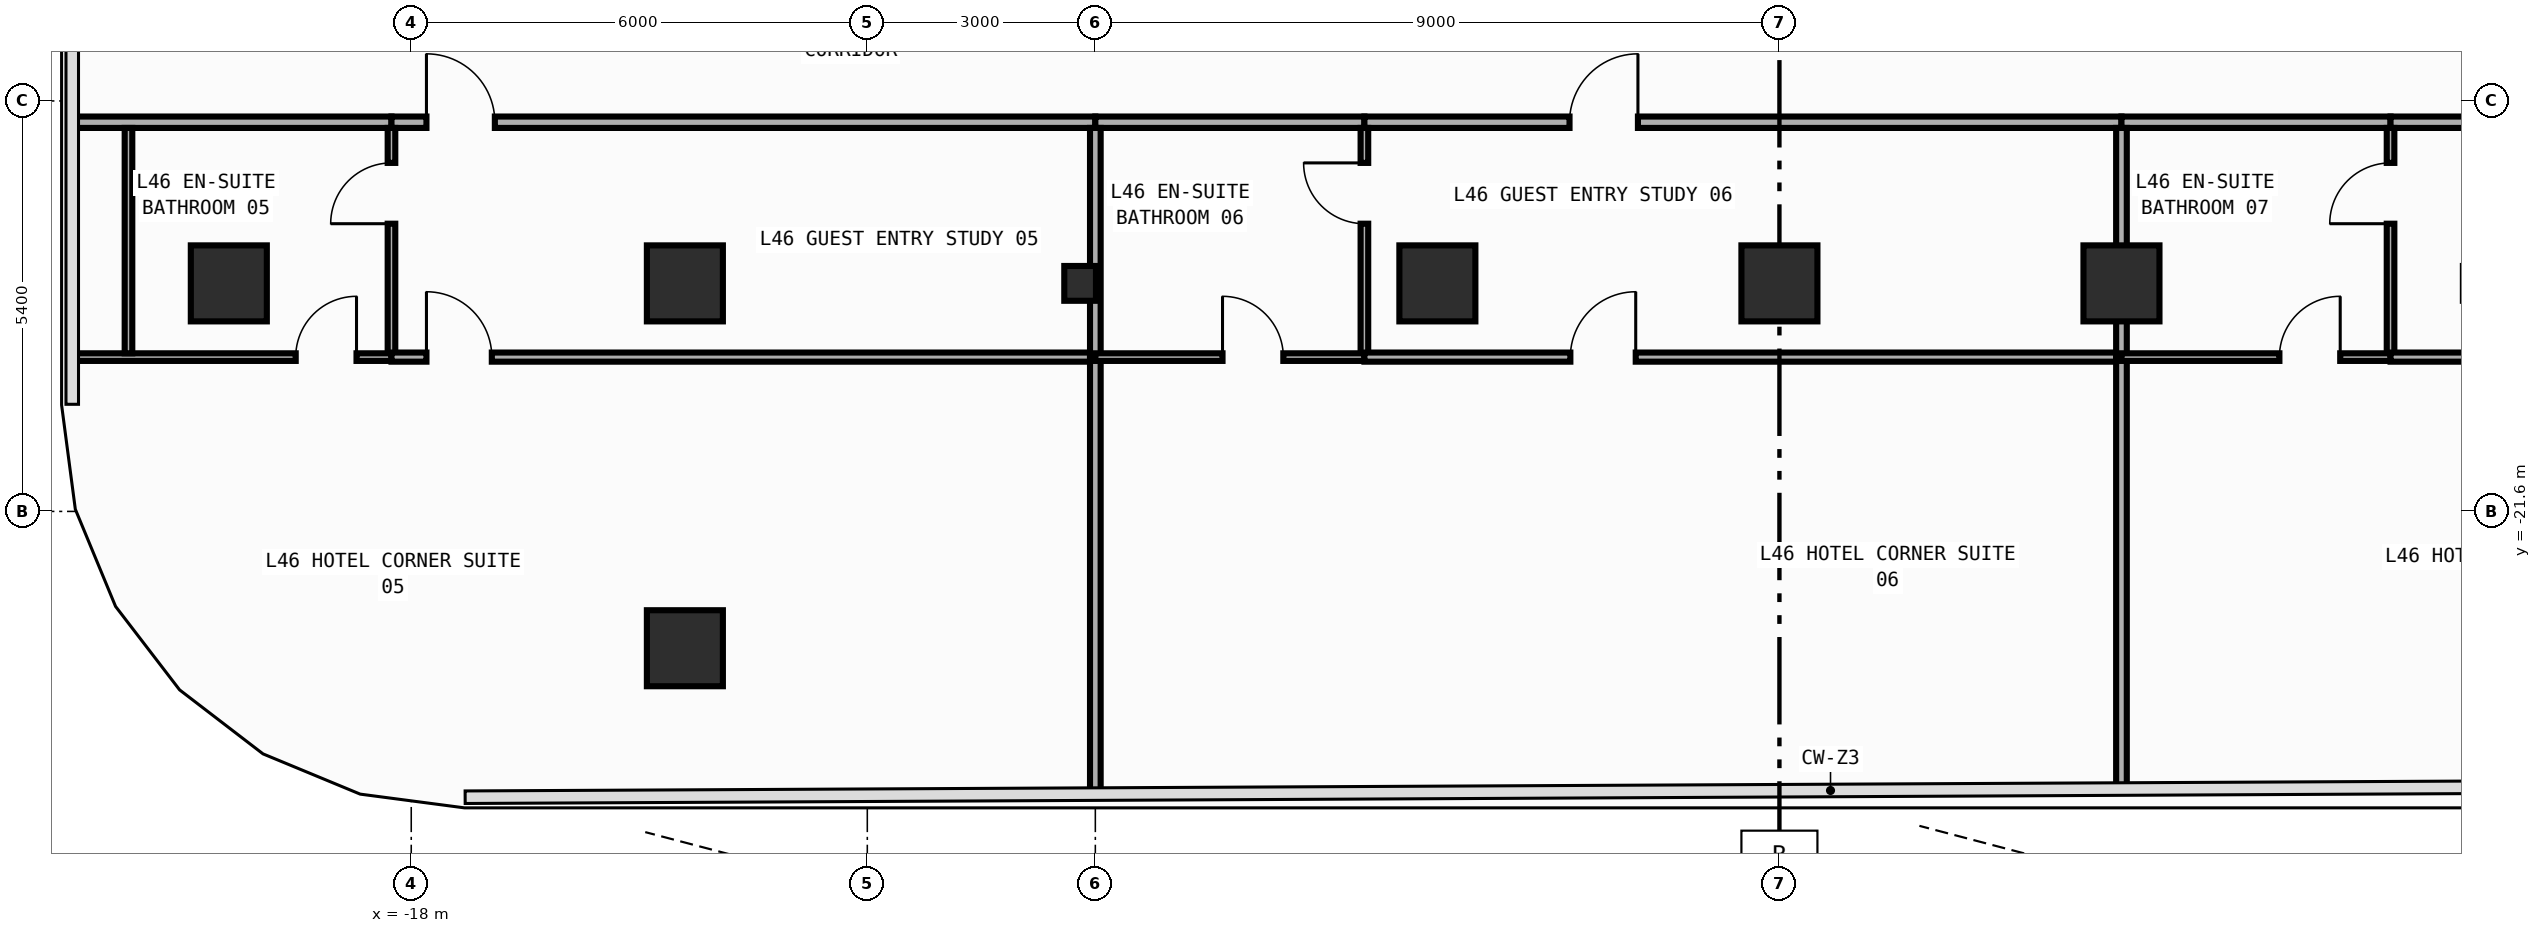
"""IFC4 building model, lengths in metres.
Left out: names, types, materials, properties, quantities, classifications, styles, units other than length and angle.
Written with IfcOpenShell. Run it as: python <this file> out.ifc"""

import sys

from ifc_helpers import new_model, si_unit, direction, frame, frame_2d, origin, origin_2d, place, context, subcontext, project, spatial, rectangle, i_section, extrude, element, fill, save


model = new_model("IFC4")
c1 = context("Model", 3, precision=1e-05, world=origin(), true_north=direction((0.0, 1.0)))
c2 = subcontext(c1, "Body", "Model", "MODEL_VIEW")
j1 = project(units=[si_unit("LENGTHUNIT", "METRE"), si_unit("PLANEANGLEUNIT", "RADIAN")], contexts=[c1])
p1 = place(None, origin())
s1 = spatial("IfcSite", under=j1, at=p1, CompositionType="ELEMENT")
p2 = place(p1, origin())
s2 = spatial("IfcBuilding", under=s1, at=p2, CompositionType="ELEMENT")
p3 = place(p2, frame((0.0, 0.0, 199.2)))
s3 = spatial("IfcBuildingStorey", under=s2, at=p3, CompositionType="ELEMENT", Elevation=199.2)
p4 = place(p3, frame((-9.2, -18.6, 0.0), z_axis=(0.0, 0.0, 1.0), x_axis=(1.0, 0.0, 0.0)))
e1 = element("IfcColumn", 1, at=p4, inside=s3, PredefinedType="COLUMN", context=c2, shape_type="SweptSolid", body=[
    extrude(i_section(OverallWidth=0.417, OverallDepth=0.458, WebThickness=0.03, FlangeThickness=0.05, FilletRadius=0.022, at=origin_2d()), origin(), (0.0, 0.0, 1.0), 3.8),
])
for number, where, z_axis, x_axis in (
    (2, (-20.4, -18.6, 0.0), (0.0, 0.0, 1.0), (1.0, 0.0, 0.0)),
    (3, (-14.4, -18.6, 0.0), (0.0, 0.0, 1.0), (1.0, 0.0, 0.0)),
    (4, (-4.5, -18.6, 0.0), (0.0, 0.0, 1.0), (1.0, 0.0, 0.0)),
    (5, (0.0, -18.6, 0.0), (0.0, 0.0, 1.0), (1.0, 0.0, 0.0)),
    (6, (4.5, -18.6, 0.0), (0.0, 0.0, 1.0), (1.0, 0.0, 0.0)),
    (7, (-14.4, -23.4, 0.0), (0.0, 0.0, 1.0), (1.0, 0.0, 0.0)),
):
    element("IfcColumn", number, at=place(p3, frame(where, z_axis=z_axis, x_axis=x_axis)), inside=s3, PredefinedType="COLUMN", context=c2, shape_type="SweptSolid", body=[
        extrude(rectangle(XDim=1.0, YDim=1.0, at=origin_2d()), origin(), (0.0, 0.0, 1.0), 3.8),
    ])
p5 = place(p3, frame((-22.455, -16.48, 0.0), z_axis=(0.0, 0.0, 1.0), x_axis=(1.0, 0.0, 0.0)))
e8 = element("IfcWall", 8, at=p5, inside=s3, PredefinedType="PARTITIONING", context=c2, shape_type="SweptSolid", body=[
    extrude(rectangle(XDim=4.195, YDim=0.15, at=frame_2d((2.098, 0.0))), origin(), (0.0, 0.0, 1.0), 3.54),
])
p6 = place(p3, frame((-18.26, -16.48, 0.0), z_axis=(0.0, 0.0, 1.0), x_axis=(1.0, 0.0, 0.0)))
e9 = element("IfcWall", 9, at=p6, inside=s3, PredefinedType="PARTITIONING", context=c2, shape_type="SweptSolid", body=[
    extrude(rectangle(XDim=9.26, YDim=0.15, at=frame_2d((4.63, 0.0))), origin(), (0.0, 0.0, 1.0), 3.54),
])
p7 = place(p6, frame((0.46, 0.0, 0.0)))
e10 = element("IfcOpeningElement", 10, at=p7, cuts=e9, PredefinedType="OPENING", context=c2, shape_type="SweptSolid", body=[
    extrude(rectangle(XDim=0.9, YDim=2.15, at=frame_2d((0.45, 1.075))), frame((0.0, 0.085, 0.0), z_axis=(0.0, -1.0, 0.0), x_axis=(1.0, 0.0, 0.0)), (0.0, 0.0, 1.0), 0.17),
])
p8 = place(p3, frame((-9.0, -16.48, 0.0), z_axis=(0.0, 0.0, 1.0), x_axis=(1.0, 0.0, 0.0)))
e11 = element("IfcWall", 11, at=p8, inside=s3, PredefinedType="PARTITIONING", context=c2, shape_type="SweptSolid", body=[
    extrude(rectangle(XDim=3.54, YDim=0.15, at=frame_2d((1.77, 0.0))), origin(), (0.0, 0.0, 1.0), 3.54),
])
p9 = place(p3, frame((-5.46, -16.48, 0.0), z_axis=(0.0, 0.0, 1.0), x_axis=(1.0, 0.0, 0.0)))
e12 = element("IfcWall", 12, at=p9, inside=s3, PredefinedType="PARTITIONING", context=c2, shape_type="SweptSolid", body=[
    extrude(rectangle(XDim=9.96, YDim=0.15, at=frame_2d((4.98, 0.0))), origin(), (0.0, 0.0, 1.0), 3.54),
])
p10 = place(p9, frame((2.698, 0.0, 0.0)))
e13 = element("IfcOpeningElement", 13, at=p10, cuts=e12, PredefinedType="OPENING", context=c2, shape_type="SweptSolid", body=[
    extrude(rectangle(XDim=0.9, YDim=2.15, at=frame_2d((0.45, 1.075))), frame((0.0, 0.085, 0.0), z_axis=(0.0, -1.0, 0.0), x_axis=(1.0, 0.0, 0.0)), (0.0, 0.0, 1.0), 0.17),
])
p11 = place(p3, frame((4.5, -16.48, 0.0), z_axis=(0.0, 0.0, 1.0), x_axis=(1.0, 0.0, 0.0)))
e14 = element("IfcWall", 14, at=p11, inside=s3, PredefinedType="PARTITIONING", context=c2, shape_type="SweptSolid", body=[
    extrude(rectangle(XDim=3.54, YDim=0.15, at=frame_2d((1.77, 0.0))), origin(), (0.0, 0.0, 1.0), 3.54),
])
p12 = place(p3, frame((8.04, -16.48, 0.0), z_axis=(0.0, 0.0, 1.0), x_axis=(1.0, 0.0, 0.0)))
e15 = element("IfcWall", 15, at=p12, inside=s3, PredefinedType="PARTITIONING", context=c2, shape_type="SweptSolid", body=[
    extrude(rectangle(XDim=4.2, YDim=0.15, at=frame_2d((2.1, 0.0))), origin(), (0.0, 0.0, 1.0), 3.54),
])
p13 = place(p12, frame((2.624, 0.0, 0.0)))
e16 = element("IfcOpeningElement", 16, at=p13, cuts=e15, PredefinedType="OPENING", context=c2, shape_type="SweptSolid", body=[
    extrude(rectangle(XDim=0.9, YDim=2.15, at=frame_2d((0.45, 1.075))), frame((0.0, 0.085, 0.0), z_axis=(0.0, -1.0, 0.0), x_axis=(1.0, 0.0, 0.0)), (0.0, 0.0, 1.0), 0.17),
])
p14 = place(p3, frame((-18.26, -19.52, 0.0), z_axis=(0.0, 0.0, 1.0), x_axis=(0.0, 1.0, 0.0)))
e17 = element("IfcWall", 17, at=p14, inside=s3, PredefinedType="PARTITIONING", context=c2, shape_type="SweptSolid", body=[
    extrude(rectangle(XDim=2.965, YDim=0.1, at=frame_2d((1.482, 0.0))), origin(), (0.0, 0.0, 1.0), 3.54),
])
p15 = place(p14, frame((1.705, 0.0, 0.0)))
e18 = element("IfcOpeningElement", 18, at=p15, cuts=e17, PredefinedType="OPENING", context=c2, shape_type="SweptSolid", body=[
    extrude(rectangle(XDim=0.8, YDim=2.1, at=frame_2d((0.4, 1.05))), frame((0.0, 0.06, 0.0), z_axis=(0.0, -1.0, 0.0), x_axis=(1.0, 0.0, 0.0)), (0.0, 0.0, 1.0), 0.12),
])
p16 = place(p3, frame((-22.455, -19.57, 0.0), z_axis=(0.0, 0.0, 1.0), x_axis=(1.0, 0.0, 0.0)))
e19 = element("IfcWall", 19, at=p16, inside=s3, PredefinedType="PARTITIONING", context=c2, shape_type="SweptSolid", body=[
    extrude(rectangle(XDim=4.195, YDim=0.1, at=frame_2d((2.098, 0.0))), origin(), (0.0, 0.0, 1.0), 3.54),
])
p17 = place(p16, frame((2.935, 0.0, 0.0)))
e20 = element("IfcOpeningElement", 20, at=p17, cuts=e19, PredefinedType="OPENING", context=c2, shape_type="SweptSolid", body=[
    extrude(rectangle(XDim=0.8, YDim=2.1, at=frame_2d((0.4, 1.05))), frame((0.0, 0.06, 0.0), z_axis=(0.0, -1.0, 0.0), x_axis=(1.0, 0.0, 0.0)), (0.0, 0.0, 1.0), 0.12),
])
p18 = place(p3, frame((-18.26, -19.57, 0.0), z_axis=(0.0, 0.0, 1.0), x_axis=(1.0, 0.0, 0.0)))
e21 = element("IfcWall", 21, at=p18, inside=s3, PredefinedType="PARTITIONING", context=c2, shape_type="SweptSolid", body=[
    extrude(rectangle(XDim=9.26, YDim=0.12, at=frame_2d((4.63, 0.0))), origin(), (0.0, 0.0, 1.0), 3.54),
])
p19 = place(p18, frame((0.46, 0.0, 0.0)))
e22 = element("IfcOpeningElement", 22, at=p19, cuts=e21, PredefinedType="OPENING", context=c2, shape_type="SweptSolid", body=[
    extrude(rectangle(XDim=0.86, YDim=2.15, at=frame_2d((0.43, 1.075))), frame((0.0, 0.07, 0.0), z_axis=(0.0, -1.0, 0.0), x_axis=(1.0, 0.0, 0.0)), (0.0, 0.0, 1.0), 0.14),
])
p20 = place(p3, frame((-9.0, -19.57, 0.0), z_axis=(0.0, 0.0, 1.0), x_axis=(0.0, 1.0, 0.0)))
e23 = element("IfcWall", 23, at=p20, inside=s3, PredefinedType="PARTITIONING", context=c2, shape_type="SweptSolid", body=[
    extrude(rectangle(XDim=3.015, YDim=0.14, at=frame_2d((1.508, 0.0))), origin(), (0.0, 0.0, 1.0), 2.952),
])
p21 = place(p3, frame((-9.0, -25.314, 0.0), z_axis=(0.0, 0.0, 1.0), x_axis=(0.0, 1.0, 0.0)))
e24 = element("IfcWall", 24, at=p21, inside=s3, PredefinedType="PARTITIONING", context=c2, shape_type="SweptSolid", body=[
    extrude(rectangle(XDim=5.744, YDim=0.14, at=frame_2d((2.872, 0.0))), origin(), (0.0, 0.0, 1.0), 3.54),
])
p22 = place(p3, frame((-5.46, -19.52, 0.0), z_axis=(0.0, 0.0, 1.0), x_axis=(0.0, 1.0, 0.0)))
e25 = element("IfcWall", 25, at=p22, inside=s3, PredefinedType="PARTITIONING", context=c2, shape_type="SweptSolid", body=[
    extrude(rectangle(XDim=2.965, YDim=0.1, at=frame_2d((1.482, 0.0))), origin(), (0.0, 0.0, 1.0), 3.54),
])
p23 = place(p22, frame((1.705, 0.0, 0.0)))
e26 = element("IfcOpeningElement", 26, at=p23, cuts=e25, PredefinedType="OPENING", context=c2, shape_type="SweptSolid", body=[
    extrude(rectangle(XDim=0.8, YDim=2.1, at=frame_2d((0.4, 1.05))), frame((0.0, 0.06, 0.0), z_axis=(0.0, -1.0, 0.0), x_axis=(1.0, 0.0, 0.0)), (0.0, 0.0, 1.0), 0.12),
])
p24 = place(p3, frame((-9.0, -19.57, 0.0), z_axis=(0.0, 0.0, 1.0), x_axis=(1.0, 0.0, 0.0)))
e27 = element("IfcWall", 27, at=p24, inside=s3, PredefinedType="PARTITIONING", context=c2, shape_type="SweptSolid", body=[
    extrude(rectangle(XDim=3.54, YDim=0.1, at=frame_2d((1.77, 0.0))), origin(), (0.0, 0.0, 1.0), 3.54),
])
p25 = place(p24, frame((1.673, 0.0, 0.0)))
e28 = element("IfcOpeningElement", 28, at=p25, cuts=e27, PredefinedType="OPENING", context=c2, shape_type="SweptSolid", body=[
    extrude(rectangle(XDim=0.8, YDim=2.1, at=frame_2d((0.4, 1.05))), frame((0.0, 0.06, 0.0), z_axis=(0.0, -1.0, 0.0), x_axis=(1.0, 0.0, 0.0)), (0.0, 0.0, 1.0), 0.12),
])
p26 = place(p3, frame((-5.46, -19.57, 0.0), z_axis=(0.0, 0.0, 1.0), x_axis=(1.0, 0.0, 0.0)))
e29 = element("IfcWall", 29, at=p26, inside=s3, PredefinedType="PARTITIONING", context=c2, shape_type="SweptSolid", body=[
    extrude(rectangle(XDim=9.96, YDim=0.12, at=frame_2d((4.98, 0.0))), origin(), (0.0, 0.0, 1.0), 3.54),
])
p27 = place(p26, frame((2.709, 0.0, 0.0)))
e30 = element("IfcOpeningElement", 30, at=p27, cuts=e29, PredefinedType="OPENING", context=c2, shape_type="SweptSolid", body=[
    extrude(rectangle(XDim=0.86, YDim=2.15, at=frame_2d((0.43, 1.075))), frame((0.0, 0.07, 0.0), z_axis=(0.0, -1.0, 0.0), x_axis=(1.0, 0.0, 0.0)), (0.0, 0.0, 1.0), 0.14),
])
p28 = place(p3, frame((4.5, -19.57, 0.0), z_axis=(0.0, 0.0, 1.0), x_axis=(0.0, 1.0, 0.0)))
e31 = element("IfcWall", 31, at=p28, inside=s3, PredefinedType="PARTITIONING", context=c2, shape_type="SweptSolid", body=[
    extrude(rectangle(XDim=3.015, YDim=0.14, at=frame_2d((1.508, 0.0))), origin(), (0.0, 0.0, 1.0), 3.54),
])
p29 = place(p3, frame((4.5, -25.248, 0.0), z_axis=(0.0, 0.0, 1.0), x_axis=(0.0, 1.0, 0.0)))
e32 = element("IfcWall", 32, at=p29, inside=s3, PredefinedType="PARTITIONING", context=c2, shape_type="SweptSolid", body=[
    extrude(rectangle(XDim=5.677, YDim=0.14, at=frame_2d((2.839, 0.0))), origin(), (0.0, 0.0, 1.0), 3.54),
])
p30 = place(p3, frame((8.04, -19.52, 0.0), z_axis=(0.0, 0.0, 1.0), x_axis=(0.0, 1.0, 0.0)))
e33 = element("IfcWall", 33, at=p30, inside=s3, PredefinedType="PARTITIONING", context=c2, shape_type="SweptSolid", body=[
    extrude(rectangle(XDim=2.965, YDim=0.1, at=frame_2d((1.482, 0.0))), origin(), (0.0, 0.0, 1.0), 3.54),
])
p31 = place(p30, frame((1.705, 0.0, 0.0)))
e34 = element("IfcOpeningElement", 34, at=p31, cuts=e33, PredefinedType="OPENING", context=c2, shape_type="SweptSolid", body=[
    extrude(rectangle(XDim=0.8, YDim=2.1, at=frame_2d((0.4, 1.05))), frame((0.0, 0.06, 0.0), z_axis=(0.0, -1.0, 0.0), x_axis=(1.0, 0.0, 0.0)), (0.0, 0.0, 1.0), 0.12),
])
p32 = place(p3, frame((4.5, -19.57, 0.0), z_axis=(0.0, 0.0, 1.0), x_axis=(1.0, 0.0, 0.0)))
e35 = element("IfcWall", 35, at=p32, inside=s3, PredefinedType="PARTITIONING", context=c2, shape_type="SweptSolid", body=[
    extrude(rectangle(XDim=3.54, YDim=0.1, at=frame_2d((1.77, 0.0))), origin(), (0.0, 0.0, 1.0), 3.54),
])
p33 = place(p32, frame((2.078, 0.0, 0.0)))
e36 = element("IfcOpeningElement", 36, at=p33, cuts=e35, PredefinedType="OPENING", context=c2, shape_type="SweptSolid", body=[
    extrude(rectangle(XDim=0.8, YDim=2.1, at=frame_2d((0.4, 1.05))), frame((0.0, 0.06, 0.0), z_axis=(0.0, -1.0, 0.0), x_axis=(1.0, 0.0, 0.0)), (0.0, 0.0, 1.0), 0.12),
])
p34 = place(p3, frame((8.04, -19.57, 0.0), z_axis=(0.0, 0.0, 1.0), x_axis=(1.0, 0.0, 0.0)))
e37 = element("IfcWall", 37, at=p34, inside=s3, PredefinedType="PARTITIONING", context=c2, shape_type="SweptSolid", body=[
    extrude(rectangle(XDim=4.2, YDim=0.12, at=frame_2d((2.1, 0.0))), origin(), (0.0, 0.0, 1.0), 3.54),
])
p35 = place(p34, frame((2.678, 0.0, 0.0)))
e38 = element("IfcOpeningElement", 38, at=p35, cuts=e37, PredefinedType="OPENING", context=c2, shape_type="SweptSolid", body=[
    extrude(rectangle(XDim=0.86, YDim=2.15, at=frame_2d((0.43, 1.075))), frame((0.0, 0.07, 0.0), z_axis=(0.0, -1.0, 0.0), x_axis=(1.0, 0.0, 0.0)), (0.0, 0.0, 1.0), 0.14),
])
p36 = place(p3, frame((-21.72, -19.52, 0.0), z_axis=(0.0, 0.0, 1.0), x_axis=(0.0, 1.0, 0.0)))
e39 = element("IfcWall", 39, at=p36, inside=s3, PredefinedType="PARTITIONING", context=c2, shape_type="SweptSolid", body=[
    extrude(rectangle(XDim=2.965, YDim=0.1, at=frame_2d((1.482, 0.0))), origin(), (0.0, 0.0, 1.0), 3.54),
])
p37 = place(p7, origin())
e40 = element("IfcDoor", 40, at=p37, inside=s3, OperationType="SINGLE_SWING_LEFT", PredefinedType="DOOR", context=c2, shape_type="SweptSolid", body=[
    extrude(rectangle(XDim=0.9, YDim=2.15, at=frame_2d((0.45, 1.075))), frame((0.0, 0.025, 0.0), z_axis=(0.0, -1.0, 0.0), x_axis=(1.0, 0.0, 0.0)), (0.0, 0.0, 1.0), 0.05),
])
fill(e10, e40)
p38 = place(p10, origin())
e41 = element("IfcDoor", 41, at=p38, inside=s3, OperationType="SINGLE_SWING_RIGHT", PredefinedType="DOOR", context=c2, shape_type="SweptSolid", body=[
    extrude(rectangle(XDim=0.9, YDim=2.15, at=frame_2d((0.45, 1.075))), frame((0.0, 0.025, 0.0), z_axis=(0.0, -1.0, 0.0), x_axis=(1.0, 0.0, 0.0)), (0.0, 0.0, 1.0), 0.05),
])
fill(e13, e41)
p39 = place(p15, origin())
e42 = element("IfcDoor", 42, at=p39, inside=s3, OperationType="SINGLE_SWING_LEFT", PredefinedType="DOOR", context=c2, shape_type="SweptSolid", body=[
    extrude(rectangle(XDim=0.8, YDim=2.1, at=frame_2d((0.4, 1.05))), frame((0.0, 0.025, 0.0), z_axis=(0.0, -1.0, 0.0), x_axis=(1.0, 0.0, 0.0)), (0.0, 0.0, 1.0), 0.05),
])
fill(e18, e42)
p40 = place(p17, origin())
e43 = element("IfcDoor", 43, at=p40, inside=s3, OperationType="SINGLE_SWING_RIGHT", PredefinedType="DOOR", context=c2, shape_type="SweptSolid", body=[
    extrude(rectangle(XDim=0.8, YDim=2.1, at=frame_2d((0.4, 1.05))), frame((0.0, 0.025, 0.0), z_axis=(0.0, -1.0, 0.0), x_axis=(1.0, 0.0, 0.0)), (0.0, 0.0, 1.0), 0.05),
])
fill(e20, e43)
p41 = place(p19, origin())
e44 = element("IfcDoor", 44, at=p41, inside=s3, OperationType="SINGLE_SWING_LEFT", PredefinedType="DOOR", context=c2, shape_type="SweptSolid", body=[
    extrude(rectangle(XDim=0.86, YDim=2.15, at=frame_2d((0.43, 1.075))), frame((0.0, 0.025, 0.0), z_axis=(0.0, -1.0, 0.0), x_axis=(1.0, 0.0, 0.0)), (0.0, 0.0, 1.0), 0.05),
])
fill(e22, e44)
p42 = place(p23, origin())
e45 = element("IfcDoor", 45, at=p42, inside=s3, OperationType="SINGLE_SWING_RIGHT", PredefinedType="DOOR", context=c2, shape_type="SweptSolid", body=[
    extrude(rectangle(XDim=0.8, YDim=2.1, at=frame_2d((0.4, 1.05))), frame((0.0, 0.025, 0.0), z_axis=(0.0, -1.0, 0.0), x_axis=(1.0, 0.0, 0.0)), (0.0, 0.0, 1.0), 0.05),
])
fill(e26, e45)
p43 = place(p25, origin())
e46 = element("IfcDoor", 46, at=p43, inside=s3, OperationType="SINGLE_SWING_LEFT", PredefinedType="DOOR", context=c2, shape_type="SweptSolid", body=[
    extrude(rectangle(XDim=0.8, YDim=2.1, at=frame_2d((0.4, 1.05))), frame((0.0, 0.025, 0.0), z_axis=(0.0, -1.0, 0.0), x_axis=(1.0, 0.0, 0.0)), (0.0, 0.0, 1.0), 0.05),
])
fill(e28, e46)
p44 = place(p27, origin())
e47 = element("IfcDoor", 47, at=p44, inside=s3, OperationType="SINGLE_SWING_RIGHT", PredefinedType="DOOR", context=c2, shape_type="SweptSolid", body=[
    extrude(rectangle(XDim=0.86, YDim=2.15, at=frame_2d((0.43, 1.075))), frame((0.0, 0.025, 0.0), z_axis=(0.0, -1.0, 0.0), x_axis=(1.0, 0.0, 0.0)), (0.0, 0.0, 1.0), 0.05),
])
fill(e30, e47)
p45 = place(p31, origin())
e48 = element("IfcDoor", 48, at=p45, inside=s3, OperationType="SINGLE_SWING_LEFT", PredefinedType="DOOR", context=c2, shape_type="SweptSolid", body=[
    extrude(rectangle(XDim=0.8, YDim=2.1, at=frame_2d((0.4, 1.05))), frame((0.0, 0.025, 0.0), z_axis=(0.0, -1.0, 0.0), x_axis=(1.0, 0.0, 0.0)), (0.0, 0.0, 1.0), 0.05),
])
fill(e34, e48)
p46 = place(p33, origin())
e49 = element("IfcDoor", 49, at=p46, inside=s3, OperationType="SINGLE_SWING_RIGHT", PredefinedType="DOOR", context=c2, shape_type="SweptSolid", body=[
    extrude(rectangle(XDim=0.8, YDim=2.1, at=frame_2d((0.4, 1.05))), frame((0.0, 0.025, 0.0), z_axis=(0.0, -1.0, 0.0), x_axis=(1.0, 0.0, 0.0)), (0.0, 0.0, 1.0), 0.05),
])
fill(e36, e49)
save(model, sys.argv[1])
